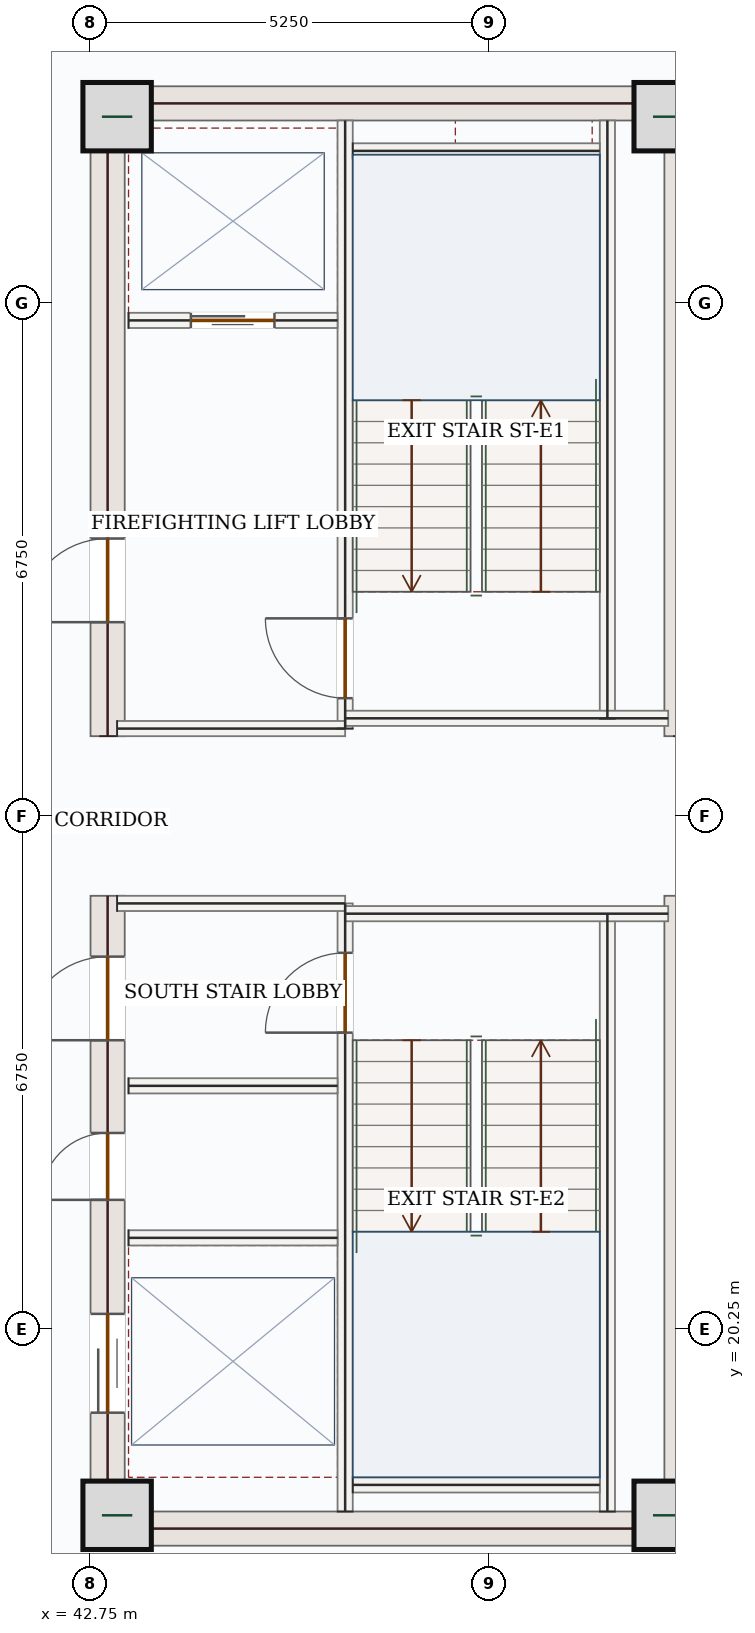
"""IFC4 building model, lengths in metres.
Left out: names, types, materials, properties, quantities, classifications, styles, units other than length and angle.
Written with IfcOpenShell. Run it as: python <this file> out.ifc"""

import sys

from ifc_helpers import new_model, si_unit, direction, frame, frame_2d, origin, origin_2d, place, context, subcontext, project, spatial, rectangle, extrude, source, transform, mapped, element, fill, save


model = new_model("IFC4")
c1 = context("Model", 3, precision=1e-05, world=origin(), true_north=direction((0.0, 1.0)))
c2 = subcontext(c1, "Body", "Model", "MODEL_VIEW")
j1 = project(units=[si_unit("LENGTHUNIT", "METRE"), si_unit("PLANEANGLEUNIT", "RADIAN")], contexts=[c1])
p1 = place(None, origin())
s1 = spatial("IfcSite", under=j1, at=p1, CompositionType="ELEMENT")
p2 = place(p1, origin())
s2 = spatial("IfcBuilding", under=s1, at=p2, CompositionType="ELEMENT")
p3 = place(p2, frame((0.0, 0.0, 353.55)))
s3 = spatial("IfcBuildingStorey", under=s2, at=p3, CompositionType="ELEMENT", Elevation=353.55)
p4 = place(p3, frame((42.975, 17.4, 0.0), z_axis=(0.0, 0.0, 1.0), x_axis=(0.0, 1.0, 0.0)))
e1 = element("IfcWall", 1, at=p4, inside=s3, PredefinedType="SHEAR", context=c2, shape_type="SweptSolid", body=[
    extrude(rectangle(XDim=8.55, YDim=0.45, at=frame_2d((4.275, 0.0))), origin(), (0.0, 0.0, 1.0), 3.5),
])
p5 = place(p4, frame((6.65, 0.0, 0.0)))
e2 = element("IfcOpeningElement", 2, at=p5, cuts=e1, PredefinedType="OPENING", context=c2, shape_type="SweptSolid", body=[
    extrude(rectangle(XDim=1.1, YDim=2.2, at=frame_2d((0.55, 1.1))), frame((0.0, 0.235, 0.0), z_axis=(0.0, -1.0, 0.0), x_axis=(1.0, 0.0, 0.0)), (0.0, 0.0, 1.0), 0.47),
])
p6 = place(p4, frame((1.75, 0.0, 0.0)))
e3 = element("IfcOpeningElement", 3, at=p6, cuts=e1, PredefinedType="OPENING", context=c2, shape_type="SweptSolid", body=[
    extrude(rectangle(XDim=1.3, YDim=2.2, at=frame_2d((0.65, 1.1))), frame((0.0, 0.235, 0.0), z_axis=(0.0, -1.0, 0.0), x_axis=(1.0, 0.0, 0.0)), (0.0, 0.0, 1.0), 0.47),
])
p7 = place(p4, frame((4.55, 0.0, 0.0)))
e4 = element("IfcOpeningElement", 4, at=p7, cuts=e1, PredefinedType="OPENING", context=c2, shape_type="SweptSolid", body=[
    extrude(rectangle(XDim=0.88, YDim=2.1, at=frame_2d((0.44, 1.05))), frame((0.0, 0.235, 0.0), z_axis=(0.0, -1.0, 0.0), x_axis=(1.0, 0.0, 0.0)), (0.0, 0.0, 1.0), 0.47),
])
p8 = place(p3, frame((42.975, 28.05, 0.0), z_axis=(0.0, 0.0, 1.0), x_axis=(0.0, 1.0, 0.0)))
e5 = element("IfcWall", 5, at=p8, inside=s3, PredefinedType="SHEAR", context=c2, shape_type="SweptSolid", body=[
    extrude(rectangle(XDim=8.55, YDim=0.45, at=frame_2d((4.275, 0.0))), origin(), (0.0, 0.0, 1.0), 3.5),
])
p9 = place(p8, frame((1.5, 0.0, 0.0)))
e6 = element("IfcOpeningElement", 6, at=p9, cuts=e5, PredefinedType="OPENING", context=c2, shape_type="SweptSolid", body=[
    extrude(rectangle(XDim=1.1, YDim=2.2, at=frame_2d((0.55, 1.1))), frame((0.0, 0.235, 0.0), z_axis=(0.0, -1.0, 0.0), x_axis=(1.0, 0.0, 0.0)), (0.0, 0.0, 1.0), 0.47),
])
m1 = source(origin(), c2, "Body", "SweptSolid", [
    extrude(rectangle(XDim=8.55, YDim=0.45, at=frame_2d((4.275, 0.0))), origin(), (0.0, 0.0, 1.0), 3.5),
])
for number, where, z_axis, x_axis in (
    (7, (50.525, 17.4, 0.0), (0.0, 0.0, 1.0), (0.0, 1.0, 0.0)),
    (8, (50.525, 28.05, 0.0), (0.0, 0.0, 1.0), (0.0, 1.0, 0.0)),
):
    element("IfcWall", number, at=place(p3, frame(where, z_axis=z_axis, x_axis=x_axis)), inside=s3, PredefinedType="SHEAR", context=c2, shape_type="MappedRepresentation", body=[
        mapped(m1, transform((0.0, 0.0, 0.0), x_axis=(1.0, 0.0, 0.0), y_axis=(0.0, 1.0, 0.0), z_axis=(0.0, 0.0, 1.0), scale=1.0)),
    ])
m2 = source(origin(), c2, "Body", "SweptSolid", [
    extrude(rectangle(XDim=7.1, YDim=0.45, at=frame_2d((3.55, 0.0))), origin(), (0.0, 0.0, 1.0), 3.5),
])
for number, where, z_axis, x_axis in (
    (9, (43.2, 17.625, 0.0), (0.0, 0.0, 1.0), (1.0, 0.0, 0.0)),
    (10, (43.2, 36.375, 0.0), (0.0, 0.0, 1.0), (1.0, 0.0, 0.0)),
):
    element("IfcWall", number, at=place(p3, frame(where, z_axis=z_axis, x_axis=x_axis)), inside=s3, PredefinedType="SHEAR", context=c2, shape_type="MappedRepresentation", body=[
        mapped(m2, transform((0.0, 0.0, 0.0), x_axis=(1.0, 0.0, 0.0), y_axis=(0.0, 1.0, 0.0), z_axis=(0.0, 0.0, 1.0), scale=1.0)),
    ])
m3 = source(origin(), c2, "Body", "SweptSolid", [
    extrude(rectangle(XDim=0.9, YDim=0.9, at=origin_2d()), origin(), (0.0, 0.0, 1.0), 3.75),
])
for number, where, z_axis, x_axis in (
    (11, (43.1, 17.8, 0.0), (0.0, 0.0, 1.0), (1.0, 0.0, 0.0)),
    (12, (50.35, 17.8, 0.0), (0.0, 0.0, 1.0), (1.0, 0.0, 0.0)),
    (13, (43.1, 36.2, 0.0), (0.0, 0.0, 1.0), (1.0, 0.0, 0.0)),
    (14, (50.35, 36.2, 0.0), (0.0, 0.0, 1.0), (1.0, 0.0, 0.0)),
):
    element("IfcColumn", number, at=place(p3, frame(where, z_axis=z_axis, x_axis=x_axis)), inside=s3, PredefinedType="COLUMN", context=c2, shape_type="MappedRepresentation", body=[
        mapped(m3, transform((0.0, 0.0, 0.0), x_axis=(1.0, 0.0, 0.0), y_axis=(0.0, 1.0, 0.0), z_axis=(0.0, 0.0, 1.0), scale=1.0)),
    ])
p10 = place(p3, frame((48.995, 39.907, 0.0), z_axis=(0.0, 0.0, 1.0), x_axis=(0.681486568047, -0.731830620821, 0.0)))
e15 = element("IfcWall", 15, at=p10, inside=s3, PredefinedType="SOLIDWALL", context=c2, shape_type="SweptSolid", body=[
    extrude(rectangle(XDim=5.965, YDim=0.28, at=frame_2d((2.982, 0.0))), origin(), (0.0, 0.0, 1.0), 3.5),
])
p11 = place(p10, frame((2.232, 0.0, 0.85)))
e16 = element("IfcOpeningElement", 16, at=p11, cuts=e15, PredefinedType="OPENING", context=c2, shape_type="SweptSolid", body=[
    extrude(rectangle(XDim=1.5, YDim=1.5, at=frame_2d((0.75, 0.75))), frame((0.0, 0.15, 0.0), z_axis=(0.0, -1.0, 0.0), x_axis=(1.0, 0.0, 0.0)), (0.0, 0.0, 1.0), 0.3),
])
m4 = source(origin(), c2, "Body", "SweptSolid", [
    extrude(rectangle(XDim=7.87, YDim=0.2, at=frame_2d((3.935, 0.0))), origin(), (0.0, 0.0, 1.0), 3.5),
])
for number, where, z_axis, x_axis in (
    (17, (49.55, 17.85, 0.0), (0.0, 0.0, 1.0), (0.0, 1.0, 0.0)),
    (18, (49.55, 28.28, 0.0), (0.0, 0.0, 1.0), (0.0, 1.0, 0.0)),
):
    element("IfcWall", number, at=place(p3, frame(where, z_axis=z_axis, x_axis=x_axis)), inside=s3, PredefinedType="SOLIDWALL", context=c2, shape_type="MappedRepresentation", body=[
        mapped(m4, transform((0.0, 0.0, 0.0), x_axis=(1.0, 0.0, 0.0), y_axis=(0.0, 1.0, 0.0), z_axis=(0.0, 0.0, 1.0), scale=1.0)),
    ])
p12 = place(p3, frame((46.1, 17.85, 0.0), z_axis=(0.0, 0.0, 1.0), x_axis=(0.0, 1.0, 0.0)))
e19 = element("IfcWall", 19, at=p12, inside=s3, PredefinedType="SOLIDWALL", context=c2, shape_type="SweptSolid", body=[
    extrude(rectangle(XDim=8.0, YDim=0.2, at=frame_2d((4.0, 0.0))), origin(), (0.0, 0.0, 1.0), 3.5),
])
p13 = place(p12, frame((6.3, 0.0, 0.0)))
e20 = element("IfcOpeningElement", 20, at=p13, cuts=e19, PredefinedType="OPENING", context=c2, shape_type="SweptSolid", body=[
    extrude(rectangle(XDim=1.05, YDim=2.15, at=frame_2d((0.525, 1.075))), frame((0.0, 0.11, 0.0), z_axis=(0.0, -1.0, 0.0), x_axis=(1.0, 0.0, 0.0)), (0.0, 0.0, 1.0), 0.22),
])
p14 = place(p3, frame((46.1, 28.15, 0.0), z_axis=(0.0, 0.0, 1.0), x_axis=(0.0, 1.0, 0.0)))
e21 = element("IfcWall", 21, at=p14, inside=s3, PredefinedType="SOLIDWALL", context=c2, shape_type="SweptSolid", body=[
    extrude(rectangle(XDim=8.0, YDim=0.2, at=frame_2d((4.0, 0.0))), origin(), (0.0, 0.0, 1.0), 3.5),
])
p15 = place(p14, frame((0.4, 0.0, 0.0)))
e22 = element("IfcOpeningElement", 22, at=p15, cuts=e21, PredefinedType="OPENING", context=c2, shape_type="SweptSolid", body=[
    extrude(rectangle(XDim=1.05, YDim=2.15, at=frame_2d((0.525, 1.075))), frame((0.0, 0.11, 0.0), z_axis=(0.0, -1.0, 0.0), x_axis=(1.0, 0.0, 0.0)), (0.0, 0.0, 1.0), 0.22),
])
m5 = source(origin(), c2, "Body", "SweptSolid", [
    extrude(rectangle(XDim=3.0, YDim=0.2, at=frame_2d((1.5, 0.0))), origin(), (0.0, 0.0, 1.0), 3.5),
])
p16 = place(p3, frame((43.1, 25.85, 0.0), z_axis=(0.0, 0.0, 1.0), x_axis=(1.0, 0.0, 0.0)))
e23 = element("IfcWall", 23, at=p16, inside=s3, PredefinedType="SOLIDWALL", context=c2, shape_type="MappedRepresentation", body=[
    mapped(m5, transform((0.0, 0.0, 0.0), x_axis=(1.0, 0.0, 0.0), y_axis=(0.0, 1.0, 0.0), z_axis=(0.0, 0.0, 1.0), scale=1.0)),
])
m6 = source(origin(), c2, "Body", "SweptSolid", [
    extrude(rectangle(XDim=4.25, YDim=0.2, at=frame_2d((2.125, 0.0))), origin(), (0.0, 0.0, 1.0), 3.5),
])
p17 = place(p3, frame((46.1, 25.715, 0.0), z_axis=(0.0, 0.0, 1.0), x_axis=(1.0, 0.0, 0.0)))
e24 = element("IfcWall", 24, at=p17, inside=s3, PredefinedType="SOLIDWALL", context=c2, shape_type="MappedRepresentation", body=[
    mapped(m6, transform((0.0, 0.0, 0.0), x_axis=(1.0, 0.0, 0.0), y_axis=(0.0, 1.0, 0.0), z_axis=(0.0, 0.0, 1.0), scale=1.0)),
])
p18 = place(p3, frame((43.1, 28.15, 0.0), z_axis=(0.0, 0.0, 1.0), x_axis=(1.0, 0.0, 0.0)))
e25 = element("IfcWall", 25, at=p18, inside=s3, PredefinedType="SOLIDWALL", context=c2, shape_type="MappedRepresentation", body=[
    mapped(m5, transform((0.0, 0.0, 0.0), x_axis=(1.0, 0.0, 0.0), y_axis=(0.0, 1.0, 0.0), z_axis=(0.0, 0.0, 1.0), scale=1.0)),
])
p19 = place(p3, frame((46.1, 28.285, 0.0), z_axis=(0.0, 0.0, 1.0), x_axis=(1.0, 0.0, 0.0)))
e26 = element("IfcWall", 26, at=p19, inside=s3, PredefinedType="SOLIDWALL", context=c2, shape_type="MappedRepresentation", body=[
    mapped(m6, transform((0.0, 0.0, 0.0), x_axis=(1.0, 0.0, 0.0), y_axis=(0.0, 1.0, 0.0), z_axis=(0.0, 0.0, 1.0), scale=1.0)),
])
m7 = source(origin(), c2, "Body", "SweptSolid", [
    extrude(rectangle(XDim=3.25, YDim=0.2, at=frame_2d((1.625, 0.0))), origin(), (0.0, 0.0, 1.0), 3.5),
])
for number, where, z_axis, x_axis in (
    (27, (46.2, 35.75, 0.0), (0.0, 0.0, 1.0), (1.0, 0.0, 0.0)),
    (28, (46.2, 18.2, 0.0), (0.0, 0.0, 1.0), (1.0, 0.0, 0.0)),
):
    element("IfcWall", number, at=place(p3, frame(where, z_axis=z_axis, x_axis=x_axis)), inside=s3, PredefinedType="SOLIDWALL", context=c2, shape_type="MappedRepresentation", body=[
        mapped(m7, transform((0.0, 0.0, 0.0), x_axis=(1.0, 0.0, 0.0), y_axis=(0.0, 1.0, 0.0), z_axis=(0.0, 0.0, 1.0), scale=1.0)),
    ])
p20 = place(p3, frame((43.25, 33.52, 0.0), z_axis=(0.0, 0.0, 1.0), x_axis=(1.0, 0.0, 0.0)))
e29 = element("IfcWall", 29, at=p20, inside=s3, PredefinedType="SOLIDWALL", context=c2, shape_type="SweptSolid", body=[
    extrude(rectangle(XDim=2.75, YDim=0.2, at=frame_2d((1.375, 0.0))), origin(), (0.0, 0.0, 1.0), 3.5),
])
p21 = place(p20, frame((0.82, 0.0, 0.0)))
e30 = element("IfcOpeningElement", 30, at=p21, cuts=e29, PredefinedType="OPENING", context=c2, shape_type="SweptSolid", body=[
    extrude(rectangle(XDim=1.1, YDim=2.15, at=frame_2d((0.55, 1.075))), frame((0.0, 0.11, 0.0), z_axis=(0.0, -1.0, 0.0), x_axis=(1.0, 0.0, 0.0)), (0.0, 0.0, 1.0), 0.22),
])
m8 = source(origin(), c2, "Body", "SweptSolid", [
    extrude(rectangle(XDim=2.75, YDim=0.2, at=frame_2d((1.375, 0.0))), origin(), (0.0, 0.0, 1.0), 3.5),
])
for number, where, z_axis, x_axis in (
    (31, (43.25, 23.45, 0.0), (0.0, 0.0, 1.0), (1.0, 0.0, 0.0)),
    (32, (43.25, 21.45, 0.0), (0.0, 0.0, 1.0), (1.0, 0.0, 0.0)),
):
    element("IfcWall", number, at=place(p3, frame(where, z_axis=z_axis, x_axis=x_axis)), inside=s3, PredefinedType="SOLIDWALL", context=c2, shape_type="MappedRepresentation", body=[
        mapped(m8, transform((0.0, 0.0, 0.0), x_axis=(1.0, 0.0, 0.0), y_axis=(0.0, 1.0, 0.0), z_axis=(0.0, 0.0, 1.0), scale=1.0)),
    ])
m9 = source(origin(), c2, "Body", "SweptSolid", [
    extrude(rectangle(XDim=1.05, YDim=2.15, at=frame_2d((0.525, 1.075))), frame((0.0, 0.025, 0.0), z_axis=(0.0, -1.0, 0.0), x_axis=(1.0, 0.0, 0.0)), (0.0, 0.0, 1.0), 0.05),
])
p22 = place(p15, origin())
e33 = element("IfcDoor", 33, at=p22, inside=s3, OperationType="SINGLE_SWING_RIGHT", PredefinedType="DOOR", context=c2, shape_type="MappedRepresentation", body=[
    mapped(m9, transform((0.0, 0.0, 0.0), x_axis=(1.0, 0.0, 0.0), y_axis=(0.0, 1.0, 0.0), z_axis=(0.0, 0.0, 1.0), scale=1.0)),
])
fill(e22, e33)
p23 = place(p13, origin())
e34 = element("IfcDoor", 34, at=p23, inside=s3, OperationType="SINGLE_SWING_LEFT", PredefinedType="DOOR", context=c2, shape_type="MappedRepresentation", body=[
    mapped(m9, transform((0.0, 0.0, 0.0), x_axis=(1.0, 0.0, 0.0), y_axis=(0.0, 1.0, 0.0), z_axis=(0.0, 0.0, 1.0), scale=1.0)),
])
fill(e20, e34)
m10 = source(origin(), c2, "Body", "SweptSolid", [
    extrude(rectangle(XDim=1.1, YDim=2.15, at=frame_2d((0.55, 1.075))), frame((0.0, 0.025, 0.0), z_axis=(0.0, -1.0, 0.0), x_axis=(1.0, 0.0, 0.0)), (0.0, 0.0, 1.0), 0.05),
])
p24 = place(p21, origin())
e35 = element("IfcDoor", 35, at=p24, inside=s3, OperationType="DOUBLE_DOOR_SLIDING", PredefinedType="DOOR", context=c2, shape_type="MappedRepresentation", body=[
    mapped(m10, transform((0.0, 0.0, 0.0), x_axis=(1.0, 0.0, 0.0), y_axis=(0.0, 1.0, 0.0), z_axis=(0.0, 0.0, 1.0), scale=1.0)),
])
fill(e30, e35)
m11 = source(origin(), c2, "Body", "SweptSolid", [
    extrude(rectangle(XDim=1.1, YDim=2.2, at=frame_2d((0.55, 1.1))), frame((0.0, 0.025, 0.0), z_axis=(0.0, -1.0, 0.0), x_axis=(1.0, 0.0, 0.0)), (0.0, 0.0, 1.0), 0.05),
])
p25 = place(p9, origin())
e36 = element("IfcDoor", 36, at=p25, inside=s3, OperationType="SINGLE_SWING_LEFT", PredefinedType="DOOR", context=c2, shape_type="MappedRepresentation", body=[
    mapped(m11, transform((0.0, 0.0, 0.0), x_axis=(1.0, 0.0, 0.0), y_axis=(0.0, 1.0, 0.0), z_axis=(0.0, 0.0, 1.0), scale=1.0)),
])
fill(e6, e36)
p26 = place(p5, origin())
e37 = element("IfcDoor", 37, at=p26, inside=s3, OperationType="SINGLE_SWING_LEFT", PredefinedType="DOOR", context=c2, shape_type="MappedRepresentation", body=[
    mapped(m11, transform((0.0, 0.0, 0.0), x_axis=(1.0, 0.0, 0.0), y_axis=(0.0, 1.0, 0.0), z_axis=(0.0, 0.0, 1.0), scale=1.0)),
])
fill(e2, e37)
m12 = source(origin(), c2, "Body", "SweptSolid", [
    extrude(rectangle(XDim=1.3, YDim=2.2, at=frame_2d((0.65, 1.1))), frame((0.0, 0.025, 0.0), z_axis=(0.0, -1.0, 0.0), x_axis=(1.0, 0.0, 0.0)), (0.0, 0.0, 1.0), 0.05),
])
p27 = place(p6, origin())
e38 = element("IfcDoor", 38, at=p27, inside=s3, OperationType="DOUBLE_DOOR_SLIDING", PredefinedType="DOOR", context=c2, shape_type="MappedRepresentation", body=[
    mapped(m12, transform((0.0, 0.0, 0.0), x_axis=(1.0, 0.0, 0.0), y_axis=(0.0, 1.0, 0.0), z_axis=(0.0, 0.0, 1.0), scale=1.0)),
])
fill(e3, e38)
m13 = source(origin(), c2, "Body", "SweptSolid", [
    extrude(rectangle(XDim=0.88, YDim=2.1, at=frame_2d((0.44, 1.05))), frame((0.0, 0.025, 0.0), z_axis=(0.0, -1.0, 0.0), x_axis=(1.0, 0.0, 0.0)), (0.0, 0.0, 1.0), 0.05),
])
p28 = place(p7, origin())
e39 = element("IfcDoor", 39, at=p28, inside=s3, OperationType="SINGLE_SWING_LEFT", PredefinedType="DOOR", context=c2, shape_type="MappedRepresentation", body=[
    mapped(m13, transform((0.0, 0.0, 0.0), x_axis=(1.0, 0.0, 0.0), y_axis=(0.0, 1.0, 0.0), z_axis=(0.0, 0.0, 1.0), scale=1.0)),
])
fill(e4, e39)
save(model, sys.argv[1])
